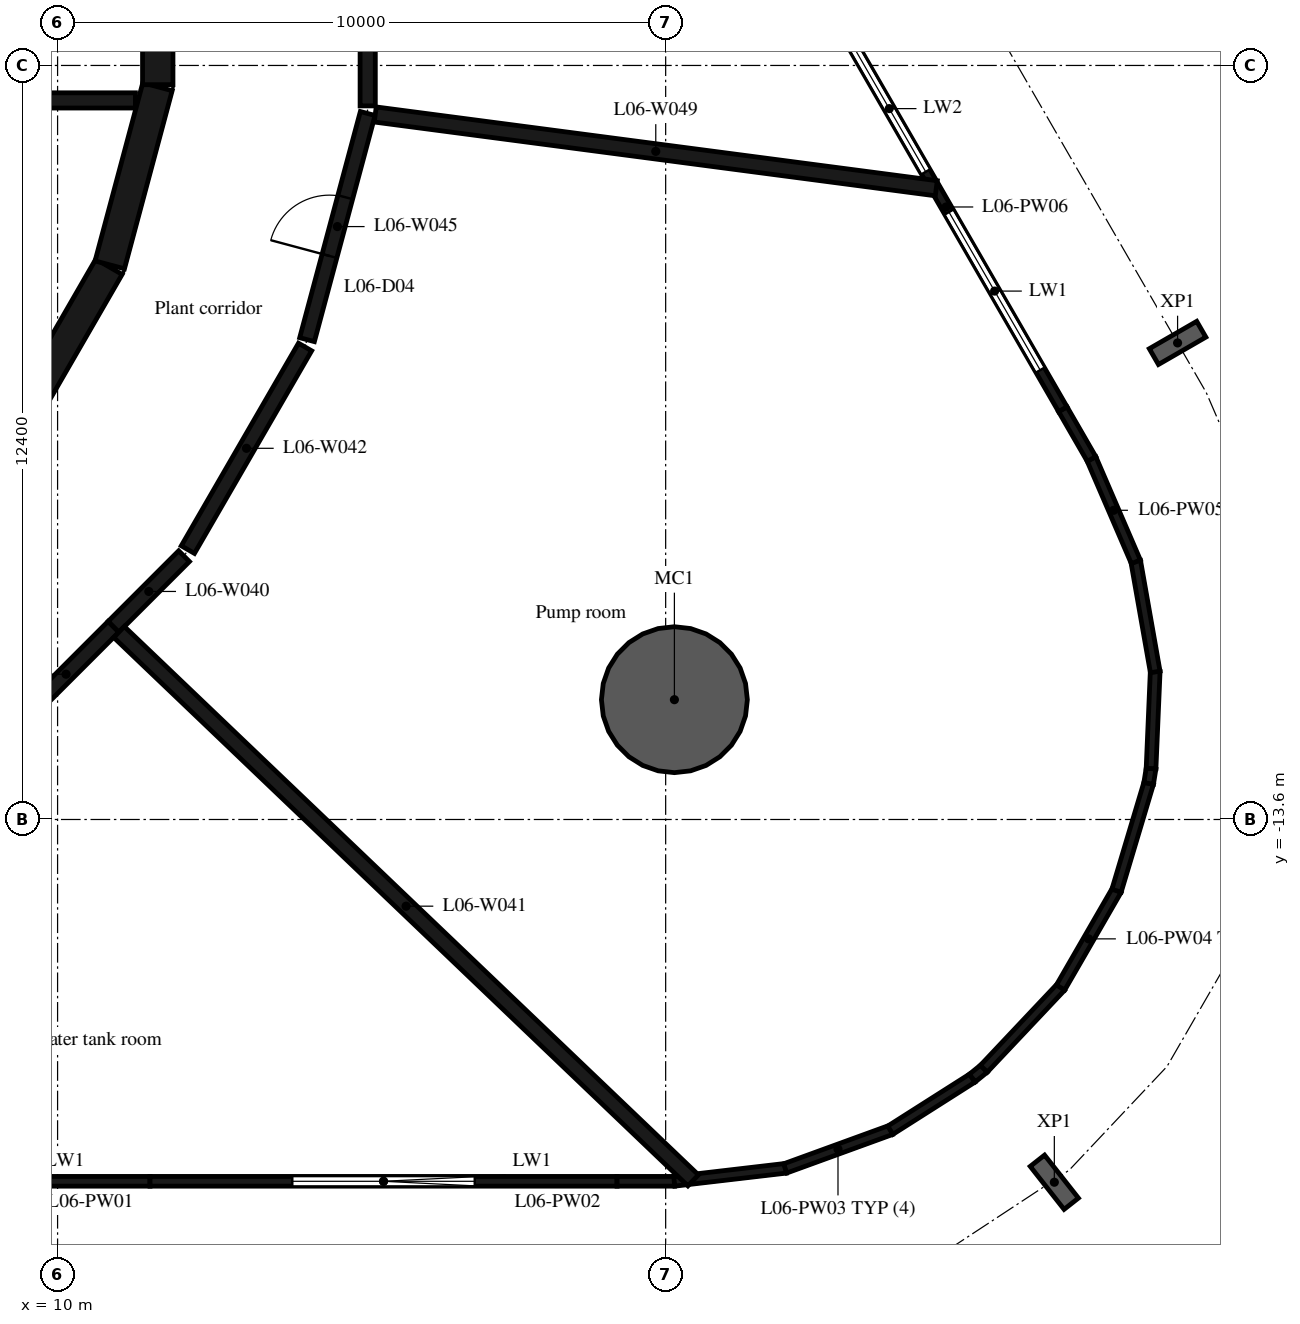
"""IFC4 building model, lengths in metres.
Left out: names, types, materials, properties, quantities, classifications, styles, units other than length and angle.
Written with IfcOpenShell. Run it as: python <this file> out.ifc"""

import sys

from ifc_helpers import new_model, si_unit, direction, frame, frame_2d, origin, origin_2d, place, context, subcontext, project, spatial, rectangle, hollow_circle, i_section, extrude, element, fill, save


model = new_model("IFC4")
c1 = context("Model", 3, precision=1e-05, world=origin(), true_north=direction((0.0, 1.0)))
c2 = subcontext(c1, "Body", "Model", "MODEL_VIEW")
j1 = project(units=[si_unit("LENGTHUNIT", "METRE"), si_unit("PLANEANGLEUNIT", "RADIAN")], contexts=[c1])
p1 = place(None, origin())
s1 = spatial("IfcSite", under=j1, at=p1, CompositionType="ELEMENT")
p2 = place(p1, origin())
s2 = spatial("IfcBuilding", under=s1, at=p2, CompositionType="ELEMENT")
p3 = place(p2, frame((0.0, 0.0, 33.0)))
s3 = spatial("IfcBuildingStorey", under=s2, at=p3, CompositionType="ELEMENT", Elevation=33.0)
p4 = place(p3, frame((20.144, -11.63, -0.45), z_axis=(0.0, 0.0, 1.0), x_axis=(1.0, 0.0, 0.0)))
e1 = element("IfcColumn", 1, at=p4, inside=s3, PredefinedType="COLUMN", context=c2, shape_type="SweptSolid", body=[
    extrude(hollow_circle(Radius=1.2, WallThickness=0.06, at=origin_2d()), origin(), (0.0, 0.0, 1.0), 5.4),
])
for number, where, z_axis, x_axis in (
    (2, (26.392, -19.565, -0.45), (0.0, 0.0, 1.0), (-0.786, -0.619, 0.0)),
    (3, (28.419, -5.763, -0.45), (0.0, 0.0, 1.0), (0.5, -0.866, 0.0)),
):
    element("IfcColumn", number, at=place(p3, frame(where, z_axis=z_axis, x_axis=x_axis)), inside=s3, PredefinedType="COLUMN", context=c2, shape_type="SweptSolid", body=[
        extrude(i_section(OverallWidth=0.3, OverallDepth=0.9, WebThickness=0.019, FlangeThickness=0.035, FilletRadius=0.03, at=origin_2d()), origin(), (0.0, 0.0, 1.0), 5.4),
    ])
p5 = place(p3, frame((3.84, -19.55, 0.0), z_axis=(0.0, 0.0, 1.0), x_axis=(1.0, 0.0, 0.0)))
e4 = element("IfcWall", 4, at=p5, inside=s3, PredefinedType="STANDARD", context=c2, shape_type="SweptSolid", body=[
    extrude(rectangle(XDim=7.68, YDim=0.16, at=frame_2d((3.84, 0.0))), origin(), (0.0, 0.0, 1.0), 4.95),
])
p6 = place(p5, frame((2.34, 0.0, 1.0)))
e5 = element("IfcOpeningElement", 5, at=p6, cuts=e4, PredefinedType="OPENING", context=c2, shape_type="SweptSolid", body=[
    extrude(rectangle(XDim=3.0, YDim=2.2, at=frame_2d((1.5, 1.1))), frame((0.0, 0.09, 0.0), z_axis=(0.0, -1.0, 0.0), x_axis=(1.0, 0.0, 0.0)), (0.0, 0.0, 1.0), 0.18),
])
p7 = place(p3, frame((11.52, -19.55, 0.0), z_axis=(0.0, 0.0, 1.0), x_axis=(1.0, 0.0, 0.0)))
e6 = element("IfcWall", 6, at=p7, inside=s3, PredefinedType="STANDARD", context=c2, shape_type="SweptSolid", body=[
    extrude(rectangle(XDim=7.68, YDim=0.16, at=frame_2d((3.84, 0.0))), origin(), (0.0, 0.0, 1.0), 4.95),
])
p8 = place(p7, frame((2.34, 0.0, 1.0)))
e7 = element("IfcOpeningElement", 7, at=p8, cuts=e6, PredefinedType="OPENING", context=c2, shape_type="SweptSolid", body=[
    extrude(rectangle(XDim=3.0, YDim=2.2, at=frame_2d((1.5, 1.1))), frame((0.0, 0.09, 0.0), z_axis=(0.0, -1.0, 0.0), x_axis=(1.0, 0.0, 0.0)), (0.0, 0.0, 1.0), 0.18),
])
p9 = place(p3, frame((19.2, -19.55, 0.0), z_axis=(0.0, 0.0, 1.0), x_axis=(1.0, 0.0, 0.0)))
e8 = element("IfcWall", 8, at=p9, inside=s3, PredefinedType="STANDARD", context=c2, shape_type="SweptSolid", body=[
    extrude(rectangle(XDim=0.946, YDim=0.16, at=frame_2d((0.473, 0.0))), origin(), (0.0, 0.0, 1.0), 4.95),
])
p10 = place(p3, frame((20.141, -19.55, 0.0), z_axis=(0.0, 0.0, 1.0), x_axis=(0.993233418606, 0.116135163342, 0.0)))
e9 = element("IfcWall", 9, at=p10, inside=s3, PredefinedType="STANDARD", context=c2, shape_type="SweptSolid", body=[
    extrude(rectangle(XDim=1.846, YDim=0.16, at=frame_2d((0.923, 0.0))), origin(), (0.0, 0.0, 1.0), 4.95),
])
p11 = place(p3, frame((21.966, -19.338, 0.0), z_axis=(0.0, 0.0, 1.0), x_axis=(0.939716242701, 0.341955235673, 0.0)))
e10 = element("IfcWall", 10, at=p11, inside=s3, PredefinedType="STANDARD", context=c2, shape_type="SweptSolid", body=[
    extrude(rectangle(XDim=1.848, YDim=0.16, at=frame_2d((0.924, 0.0))), origin(), (0.0, 0.0, 1.0), 4.95),
])
p12 = place(p3, frame((23.694, -18.71, 0.0), z_axis=(0.0, 0.0, 1.0), x_axis=(0.844000986035, 0.536341622076, 0.0)))
e11 = element("IfcWall", 11, at=p12, inside=s3, PredefinedType="STANDARD", context=c2, shape_type="SweptSolid", body=[
    extrude(rectangle(XDim=1.598, YDim=0.16, at=frame_2d((0.799, 0.0))), origin(), (0.0, 0.0, 1.0), 4.95),
])
p13 = place(p3, frame((25.043, -17.853, 0.0), z_axis=(0.0, 0.0, 1.0), x_axis=(0.775874220568, 0.630887623795, 0.0)))
e12 = element("IfcWall", 12, at=p13, inside=s3, PredefinedType="STANDARD", context=c2, shape_type="SweptSolid", body=[
    extrude(rectangle(XDim=0.249, YDim=0.16, at=frame_2d((0.125, 0.0))), origin(), (0.0, 0.0, 1.0), 4.95),
])
p14 = place(p3, frame((25.233, -17.699, 0.0), z_axis=(0.0, 0.0, 1.0), x_axis=(0.686176861491, 0.727434749482, 0.0)))
e13 = element("IfcWall", 13, at=p14, inside=s3, PredefinedType="STANDARD", context=c2, shape_type="SweptSolid", body=[
    extrude(rectangle(XDim=1.846, YDim=0.16, at=frame_2d((0.923, 0.0))), origin(), (0.0, 0.0, 1.0), 4.95),
])
p15 = place(p3, frame((26.494, -16.364, 0.0), z_axis=(0.0, 0.0, 1.0), x_axis=(0.499932070267, 0.866064619482, 0.0)))
e14 = element("IfcWall", 14, at=p15, inside=s3, PredefinedType="STANDARD", context=c2, shape_type="SweptSolid", body=[
    extrude(rectangle(XDim=1.848, YDim=0.16, at=frame_2d((0.924, 0.0))), origin(), (0.0, 0.0, 1.0), 4.95),
])
p16 = place(p3, frame((27.415, -14.771, 0.0), z_axis=(0.0, 0.0, 1.0), x_axis=(0.286838279013, 0.957979019443, 0.0)))
e15 = element("IfcWall", 15, at=p16, inside=s3, PredefinedType="STANDARD", context=c2, shape_type="SweptSolid", body=[
    extrude(rectangle(XDim=1.846, YDim=0.16, at=frame_2d((0.923, 0.0))), origin(), (0.0, 0.0, 1.0), 4.95),
])
p17 = place(p3, frame((27.943, -13.008, 0.0), z_axis=(0.0, 0.0, 1.0), x_axis=(0.158678095384, 0.987330371277, 0.0)))
e16 = element("IfcWall", 16, at=p17, inside=s3, PredefinedType="STANDARD", context=c2, shape_type="SweptSolid", body=[
    extrude(rectangle(XDim=0.249, YDim=0.16, at=frame_2d((0.125, 0.0))), origin(), (0.0, 0.0, 1.0), 4.95),
])
p18 = place(p3, frame((27.982, -12.762, 0.0), z_axis=(0.0, 0.0, 1.0), x_axis=(0.042469293695, 0.999097772539, 0.0)))
e17 = element("IfcWall", 17, at=p18, inside=s3, PredefinedType="STANDARD", context=c2, shape_type="SweptSolid", body=[
    extrude(rectangle(XDim=1.598, YDim=0.16, at=frame_2d((0.799, 0.0))), origin(), (0.0, 0.0, 1.0), 4.95),
])
p19 = place(p3, frame((28.051, -11.174, 0.0), z_axis=(0.0, 0.0, 1.0), x_axis=(-0.173732575917, 0.984792867595, 0.0)))
e18 = element("IfcWall", 18, at=p19, inside=s3, PredefinedType="STANDARD", context=c2, shape_type="SweptSolid", body=[
    extrude(rectangle(XDim=1.848, YDim=0.16, at=frame_2d((0.924, 0.0))), origin(), (0.0, 0.0, 1.0), 4.95),
])
p20 = place(p3, frame((27.733, -9.363, 0.0), z_axis=(0.0, 0.0, 1.0), x_axis=(-0.395977414549, 0.918260250238, 0.0)))
e19 = element("IfcWall", 19, at=p20, inside=s3, PredefinedType="STANDARD", context=c2, shape_type="SweptSolid", body=[
    extrude(rectangle(XDim=1.846, YDim=0.16, at=frame_2d((0.923, 0.0))), origin(), (0.0, 0.0, 1.0), 4.95),
])
p21 = place(p3, frame((27.004, -7.672, 0.0), z_axis=(0.0, 0.0, 1.0), x_axis=(-0.499998034377, 0.866026538634, 0.0)))
e20 = element("IfcWall", 20, at=p21, inside=s3, PredefinedType="STANDARD", context=c2, shape_type="SweptSolid", body=[
    extrude(rectangle(XDim=0.946, YDim=0.16, at=frame_2d((0.473, 0.0))), origin(), (0.0, 0.0, 1.0), 4.95),
])
p22 = place(p3, frame((26.531, -6.853, 0.0), z_axis=(0.0, 0.0, 1.0), x_axis=(-0.500005879718, 0.866022009101, 0.0)))
e21 = element("IfcWall", 21, at=p22, inside=s3, PredefinedType="STANDARD", context=c2, shape_type="SweptSolid", body=[
    extrude(rectangle(XDim=7.68, YDim=0.16, at=frame_2d((3.84, 0.0))), origin(), (0.0, 0.0, 1.0), 4.95),
])
p23 = place(p22, frame((0.743, 0.0, 1.0)))
e22 = element("IfcOpeningElement", 22, at=p23, cuts=e21, PredefinedType="OPENING", context=c2, shape_type="SweptSolid", body=[
    extrude(rectangle(XDim=3.0, YDim=2.2, at=frame_2d((1.5, 1.1))), frame((0.0, 0.09, 0.0), z_axis=(0.0, -1.0, 0.0), x_axis=(1.0, 0.0, 0.0)), (0.0, 0.0, 1.0), 0.18),
])
p24 = place(p22, frame((4.508, 0.0, 1.0)))
e23 = element("IfcOpeningElement", 23, at=p24, cuts=e21, PredefinedType="OPENING", context=c2, shape_type="SweptSolid", body=[
    extrude(rectangle(XDim=2.4, YDim=2.2, at=frame_2d((1.2, 1.1))), frame((0.0, 0.09, 0.0), z_axis=(0.0, -1.0, 0.0), x_axis=(1.0, 0.0, 0.0)), (0.0, 0.0, 1.0), 0.18),
])
for number, where, z_axis, x_axis in (
    (24, (9.329, -7.137, 0.0), (0.0, 0.0, 1.0), (0.5, 0.866, 0.0)),
    (25, (10.858, -4.479, 0.0), (0.0, 0.0, 1.0), (0.259, 0.966, 0.0)),
):
    element("IfcWall", number, at=place(p3, frame(where, z_axis=z_axis, x_axis=x_axis)), inside=s3, PredefinedType="SHEAR", context=c2, shape_type="SweptSolid", body=[
        extrude(rectangle(XDim=3.033, YDim=0.5, at=frame_2d((1.516, 0.0))), origin(), (0.0, 0.0, 1.0), 4.95),
    ])
p25 = place(p3, frame((11.647, -1.516, 0.0), z_axis=(0.0, 0.0, 1.0), x_axis=(0.0, 1.0, 0.0)))
e26 = element("IfcWall", 26, at=p25, inside=s3, PredefinedType="SHEAR", context=c2, shape_type="SweptSolid", body=[
    extrude(rectangle(XDim=3.033, YDim=0.5, at=frame_2d((1.516, 0.0))), origin(), (0.0, 0.0, 1.0), 4.95),
])
p26 = place(p25, frame((0.616, 0.0, 0.0)))
e27 = element("IfcOpeningElement", 27, at=p26, cuts=e26, PredefinedType="OPENING", context=c2, shape_type="SweptSolid", body=[
    extrude(rectangle(XDim=1.8, YDim=2.1, at=frame_2d((0.9, 1.05))), frame((0.0, 0.26, 0.0), z_axis=(0.0, -1.0, 0.0), x_axis=(1.0, 0.0, 0.0)), (0.0, 0.0, 1.0), 0.52),
])
p27 = place(p3, frame((3.35, -1.775, 0.0), z_axis=(0.0, 0.0, 1.0), x_axis=(1.0, 0.0, 0.0)))
e28 = element("IfcWall", 28, at=p27, inside=s3, PredefinedType="SHEAR", context=c2, shape_type="SweptSolid", body=[
    extrude(rectangle(XDim=7.93, YDim=0.25, at=frame_2d((3.965, 0.0))), origin(), (0.0, 0.0, 1.0), 4.95),
])
p28 = place(p27, frame((0.4, 0.0, 0.0)))
e29 = element("IfcOpeningElement", 29, at=p28, cuts=e28, PredefinedType="OPENING", context=c2, shape_type="SweptSolid", body=[
    extrude(rectangle(XDim=1.1, YDim=2.4, at=frame_2d((0.55, 1.2))), frame((0.0, 0.135, 0.0), z_axis=(0.0, -1.0, 0.0), x_axis=(1.0, 0.0, 0.0)), (0.0, 0.0, 1.0), 0.27),
])
p29 = place(p27, frame((2.55, 0.0, 0.0)))
e30 = element("IfcOpeningElement", 30, at=p29, cuts=e28, PredefinedType="OPENING", context=c2, shape_type="SweptSolid", body=[
    extrude(rectangle(XDim=1.1, YDim=2.4, at=frame_2d((0.55, 1.2))), frame((0.0, 0.135, 0.0), z_axis=(0.0, -1.0, 0.0), x_axis=(1.0, 0.0, 0.0)), (0.0, 0.0, 1.0), 0.27),
])
p30 = place(p27, frame((4.7, 0.0, 0.0)))
e31 = element("IfcOpeningElement", 31, at=p30, cuts=e28, PredefinedType="OPENING", context=c2, shape_type="SweptSolid", body=[
    extrude(rectangle(XDim=1.1, YDim=2.4, at=frame_2d((0.55, 1.2))), frame((0.0, 0.135, 0.0), z_axis=(0.0, -1.0, 0.0), x_axis=(1.0, 0.0, 0.0)), (0.0, 0.0, 1.0), 0.27),
])
p31 = place(p3, frame((9.358, -11.992, 0.0), z_axis=(0.0, 0.0, 1.0), x_axis=(0.707051506082, 0.707162051971, 0.0)))
e32 = element("IfcWall", 32, at=p31, inside=s3, PredefinedType="PARTITIONING", context=c2, shape_type="SweptSolid", body=[
    extrude(rectangle(XDim=2.208, YDim=0.25, at=frame_2d((1.104, 0.0))), origin(), (0.0, 0.0, 1.0), 4.95),
])
p32 = place(p3, frame((10.92, -10.43, 0.0), z_axis=(0.0, 0.0, 1.0), x_axis=(0.707181186066, 0.707032368477, 0.0)))
e33 = element("IfcWall", 33, at=p32, inside=s3, PredefinedType="PARTITIONING", context=c2, shape_type="SweptSolid", body=[
    extrude(rectangle(XDim=1.641, YDim=0.25, at=frame_2d((0.82, 0.0))), origin(), (0.0, 0.0, 1.0), 4.95),
])
p33 = place(p3, frame((11.01, -10.516, 0.0), z_axis=(0.0, 0.0, 1.0), x_axis=(0.723132638847, -0.690709191074, 0.0)))
e34 = element("IfcWall", 34, at=p33, inside=s3, PredefinedType="PARTITIONING", context=c2, shape_type="SweptSolid", body=[
    extrude(rectangle(XDim=13.057, YDim=0.25, at=frame_2d((6.528, 0.0))), origin(), (0.0, 0.0, 1.0), 4.95),
])
p34 = place(p3, frame((12.143, -9.162, 0.0), z_axis=(0.0, 0.0, 1.0), x_axis=(0.500756218026, 0.865588360659, 0.0)))
e35 = element("IfcWall", 35, at=p34, inside=s3, PredefinedType="PARTITIONING", context=c2, shape_type="SweptSolid", body=[
    extrude(rectangle(XDim=3.849, YDim=0.25, at=frame_2d((1.925, 0.0))), origin(), (0.0, 0.0, 1.0), 4.95),
])
p35 = place(p3, frame((14.102, -5.709, 0.0), z_axis=(0.0, 0.0, 1.0), x_axis=(0.259118468411, 0.965845546311, 0.0)))
e36 = element("IfcWall", 36, at=p35, inside=s3, PredefinedType="PARTITIONING", context=c2, shape_type="SweptSolid", body=[
    extrude(rectangle(XDim=3.851, YDim=0.25, at=frame_2d((1.925, 0.0))), origin(), (0.0, 0.0, 1.0), 4.95),
])
p36 = place(p35, frame((1.425, 0.0, 0.0)))
e37 = element("IfcOpeningElement", 37, at=p36, cuts=e36, PredefinedType="OPENING", context=c2, shape_type="SweptSolid", body=[
    extrude(rectangle(XDim=1.0, YDim=2.1, at=frame_2d((0.5, 1.05))), frame((0.0, 0.135, 0.0), z_axis=(0.0, -1.0, 0.0), x_axis=(1.0, 0.0, 0.0)), (0.0, 0.0, 1.0), 0.27),
])
p37 = place(p3, frame((15.1, -1.865, 0.0), z_axis=(0.0, 0.0, 1.0), x_axis=(0.0, 1.0, 0.0)))
e38 = element("IfcWall", 38, at=p37, inside=s3, PredefinedType="PARTITIONING", context=c2, shape_type="SweptSolid", body=[
    extrude(rectangle(XDim=3.855, YDim=0.25, at=frame_2d((1.927, 0.0))), origin(), (0.0, 0.0, 1.0), 4.95),
])
p38 = place(p37, frame((1.427, 0.0, 0.0)))
e39 = element("IfcOpeningElement", 39, at=p38, cuts=e38, PredefinedType="OPENING", context=c2, shape_type="SweptSolid", body=[
    extrude(rectangle(XDim=1.0, YDim=2.1, at=frame_2d((0.5, 1.05))), frame((0.0, 0.135, 0.0), z_axis=(0.0, -1.0, 0.0), x_axis=(1.0, 0.0, 0.0)), (0.0, 0.0, 1.0), 0.27),
])
p39 = place(p3, frame((15.224, -2.006, 0.0), z_axis=(0.0, 0.0, 1.0), x_axis=(0.991467059625, -0.130357468824, 0.0)))
e40 = element("IfcWall", 40, at=p39, inside=s3, PredefinedType="PARTITIONING", context=c2, shape_type="SweptSolid", body=[
    extrude(rectangle(XDim=9.306, YDim=0.25, at=frame_2d((4.653, 0.0))), origin(), (0.0, 0.0, 1.0), 4.95),
])
p40 = place(p8, origin())
e41 = element("IfcWindow", 41, at=p40, inside=s3, PartitioningType="SINGLE_PANEL", PredefinedType="WINDOW", context=c2, shape_type="SweptSolid", body=[
    extrude(rectangle(XDim=3.0, YDim=2.2, at=frame_2d((1.5, 1.1))), frame((0.0, 0.03, 0.0), z_axis=(0.0, -1.0, 0.0), x_axis=(1.0, 0.0, 0.0)), (0.0, 0.0, 1.0), 0.06),
])
fill(e7, e41)
p41 = place(p23, origin())
e42 = element("IfcWindow", 42, at=p41, inside=s3, PartitioningType="SINGLE_PANEL", PredefinedType="WINDOW", context=c2, shape_type="SweptSolid", body=[
    extrude(rectangle(XDim=3.0, YDim=2.2, at=frame_2d((1.5, 1.1))), frame((0.0, 0.03, 0.0), z_axis=(0.0, -1.0, 0.0), x_axis=(1.0, 0.0, 0.0)), (0.0, 0.0, 1.0), 0.06),
])
fill(e22, e42)
p42 = place(p24, origin())
e43 = element("IfcWindow", 43, at=p42, inside=s3, PartitioningType="SINGLE_PANEL", PredefinedType="WINDOW", context=c2, shape_type="SweptSolid", body=[
    extrude(rectangle(XDim=2.4, YDim=2.2, at=frame_2d((1.2, 1.1))), frame((0.0, 0.03, 0.0), z_axis=(0.0, -1.0, 0.0), x_axis=(1.0, 0.0, 0.0)), (0.0, 0.0, 1.0), 0.06),
])
fill(e23, e43)
p43 = place(p36, origin())
e44 = element("IfcDoor", 44, at=p43, inside=s3, OperationType="SINGLE_SWING_LEFT", PredefinedType="DOOR", context=c2, shape_type="SweptSolid", body=[
    extrude(rectangle(XDim=1.0, YDim=2.1, at=frame_2d((0.5, 1.05))), frame((0.0, 0.025, 0.0), z_axis=(0.0, -1.0, 0.0), x_axis=(1.0, 0.0, 0.0)), (0.0, 0.0, 1.0), 0.05),
])
fill(e37, e44)
save(model, sys.argv[1])
